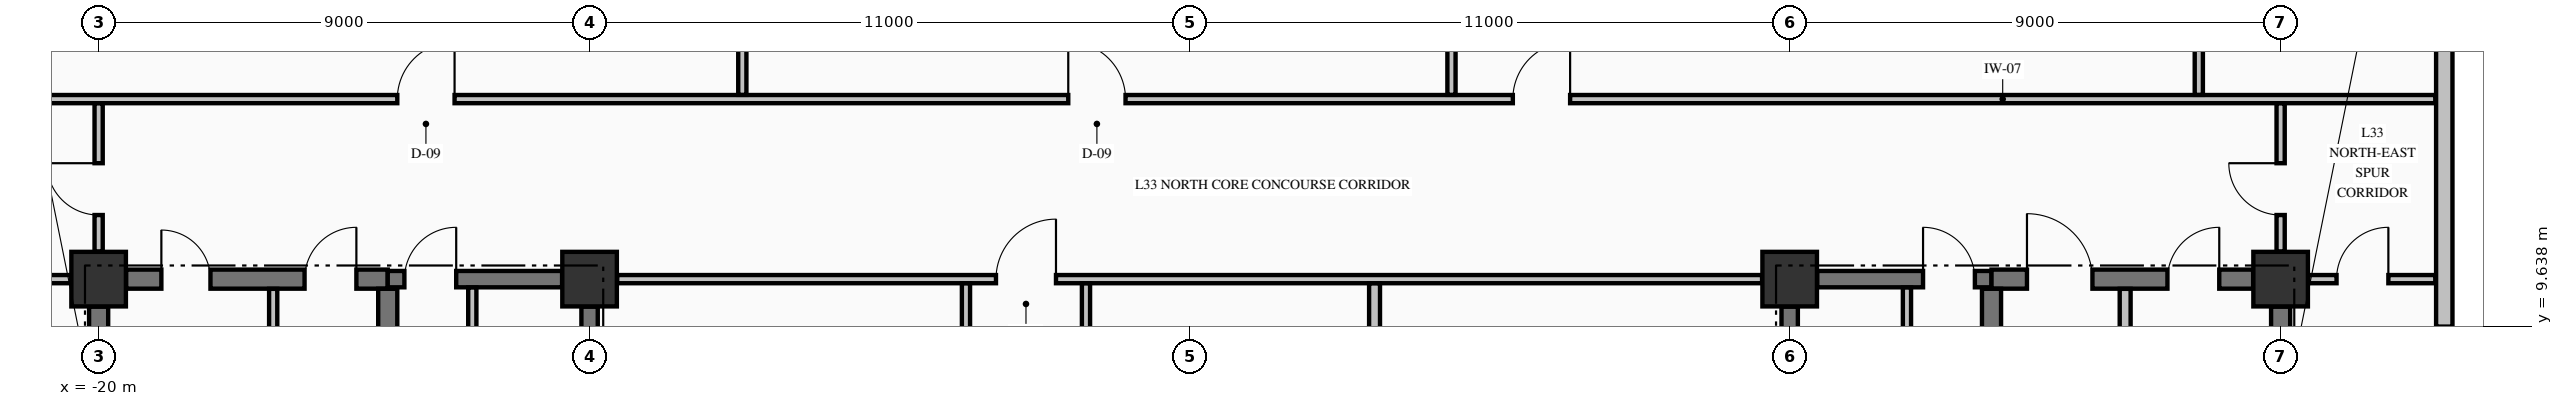
"""IFC4 building model, lengths in metres.
Left out: names, types, materials, properties, quantities, classifications, styles, units other than length and angle.
Written with IfcOpenShell. Run it as: python <this file> out.ifc"""

import sys

from ifc_helpers import new_model, si_unit, direction, frame, frame_2d, origin, origin_2d, place, context, subcontext, project, spatial, rectangle, extrude, element, fill, save


model = new_model("IFC4")
c1 = context("Model", 3, precision=1e-05, world=origin(), true_north=direction((0.0, 1.0)))
c2 = subcontext(c1, "Body", "Model", "MODEL_VIEW")
j1 = project(units=[si_unit("LENGTHUNIT", "METRE"), si_unit("PLANEANGLEUNIT", "RADIAN")], contexts=[c1])
p1 = place(None, origin())
s1 = spatial("IfcSite", under=j1, at=p1, CompositionType="ELEMENT")
p2 = place(p1, origin())
s2 = spatial("IfcBuilding", under=s1, at=p2, CompositionType="ELEMENT")
p3 = place(p2, frame((0.0, 0.0, 132.06)))
s3 = spatial("IfcBuildingStorey", under=s2, at=p3, CompositionType="ELEMENT", Elevation=132.06)
for number, where, z_axis, x_axis in (
    (1, (-20.0, 10.5, -0.25), (0.0, 0.0, 1.0), (1.0, 0.0, 0.0)),
    (2, (-11.0, 10.5, -0.25), (0.0, 0.0, 1.0), (1.0, 0.0, 0.0)),
    (3, (11.0, 10.5, -0.25), (0.0, 0.0, 1.0), (1.0, 0.0, 0.0)),
    (4, (20.0, 10.5, -0.25), (0.0, 0.0, 1.0), (1.0, 0.0, 0.0)),
):
    element("IfcColumn", number, at=place(p3, frame(where, z_axis=z_axis, x_axis=x_axis)), inside=s3, PredefinedType="COLUMN", context=c2, shape_type="SweptSolid", body=[
        extrude(rectangle(XDim=1.0, YDim=1.0, at=origin_2d()), origin(), (0.0, 0.0, 1.0), 3.57),
    ])
p4 = place(p3, frame((23.0, 9.63, 0.0), z_axis=(0.0, 0.0, 1.0), x_axis=(0.0, 1.0, 0.0)))
e5 = element("IfcWall", 5, at=p4, inside=s3, PredefinedType="STANDARD", context=c2, shape_type="SweptSolid", body=[
    extrude(rectangle(XDim=10.74, YDim=0.3, at=frame_2d((5.37, 0.0))), origin(), (0.0, 0.0, 1.0), 2.712),
])
p5 = place(p3, frame((-19.496, 10.5, 0.0), z_axis=(0.0, 0.0, 1.0), x_axis=(1.0, 0.0, 0.0)))
e6 = element("IfcWall", 6, at=p5, inside=s3, PredefinedType="SHEAR", context=c2, shape_type="SweptSolid", body=[
    extrude(rectangle(XDim=4.796, YDim=0.35, at=frame_2d((2.398, 0.0))), origin(), (0.0, 0.0, 1.0), 3.32),
])
p6 = place(p5, frame((0.646, 0.0, 0.0)))
e7 = element("IfcOpeningElement", 7, at=p6, cuts=e6, PredefinedType="OPENING", context=c2, shape_type="SweptSolid", body=[
    extrude(rectangle(XDim=0.9, YDim=2.15, at=frame_2d((0.45, 1.075))), frame((0.0, 0.185, 0.0), z_axis=(0.0, -1.0, 0.0), x_axis=(1.0, 0.0, 0.0)), (0.0, 0.0, 1.0), 0.37),
])
p7 = place(p5, frame((3.271, 0.0, 0.0)))
e8 = element("IfcOpeningElement", 8, at=p7, cuts=e6, PredefinedType="OPENING", context=c2, shape_type="SweptSolid", body=[
    extrude(rectangle(XDim=0.95, YDim=2.15, at=frame_2d((0.475, 1.075))), frame((0.0, 0.185, 0.0), z_axis=(0.0, -1.0, 0.0), x_axis=(1.0, 0.0, 0.0)), (0.0, 0.0, 1.0), 0.37),
])
p8 = place(p3, frame((-14.7, 10.5, 0.0), z_axis=(0.0, 0.0, 1.0), x_axis=(1.0, 0.0, 0.0)))
e9 = element("IfcWall", 9, at=p8, inside=s3, PredefinedType="SHEAR", context=c2, shape_type="SweptSolid", body=[
    extrude(rectangle(XDim=3.196, YDim=0.3, at=frame_2d((1.598, 0.0))), origin(), (0.0, 0.0, 1.0), 3.32),
])
p9 = place(p8, frame((0.305, 0.0, 0.0)))
e10 = element("IfcOpeningElement", 10, at=p9, cuts=e9, PredefinedType="OPENING", context=c2, shape_type="SweptSolid", body=[
    extrude(rectangle(XDim=0.95, YDim=2.15, at=frame_2d((0.475, 1.075))), frame((0.0, 0.16, 0.0), z_axis=(0.0, -1.0, 0.0), x_axis=(1.0, 0.0, 0.0)), (0.0, 0.0, 1.0), 0.32),
])
p10 = place(p3, frame((11.504, 10.5, 0.0), z_axis=(0.0, 0.0, 1.0), x_axis=(1.0, 0.0, 0.0)))
e11 = element("IfcWall", 11, at=p10, inside=s3, PredefinedType="SHEAR", context=c2, shape_type="SweptSolid", body=[
    extrude(rectangle(XDim=3.196, YDim=0.3, at=frame_2d((1.598, 0.0))), origin(), (0.0, 0.0, 1.0), 3.32),
])
p11 = place(p10, frame((1.941, 0.0, 0.0)))
e12 = element("IfcOpeningElement", 12, at=p11, cuts=e11, PredefinedType="OPENING", context=c2, shape_type="SweptSolid", body=[
    extrude(rectangle(XDim=0.95, YDim=2.15, at=frame_2d((0.475, 1.075))), frame((0.0, 0.16, 0.0), z_axis=(0.0, -1.0, 0.0), x_axis=(1.0, 0.0, 0.0)), (0.0, 0.0, 1.0), 0.32),
])
p12 = place(p3, frame((14.7, 10.5, 0.0), z_axis=(0.0, 0.0, 1.0), x_axis=(1.0, 0.0, 0.0)))
e13 = element("IfcWall", 13, at=p12, inside=s3, PredefinedType="SHEAR", context=c2, shape_type="SweptSolid", body=[
    extrude(rectangle(XDim=4.796, YDim=0.35, at=frame_2d((2.398, 0.0))), origin(), (0.0, 0.0, 1.0), 3.32),
])
p13 = place(p12, frame((0.65, 0.0, 0.0)))
e14 = element("IfcOpeningElement", 14, at=p13, cuts=e13, PredefinedType="OPENING", context=c2, shape_type="SweptSolid", body=[
    extrude(rectangle(XDim=1.2, YDim=2.15, at=frame_2d((0.6, 1.075))), frame((0.0, 0.185, 0.0), z_axis=(0.0, -1.0, 0.0), x_axis=(1.0, 0.0, 0.0)), (0.0, 0.0, 1.0), 0.37),
])
p14 = place(p12, frame((3.225, 0.0, 0.0)))
e15 = element("IfcOpeningElement", 15, at=p14, cuts=e13, PredefinedType="OPENING", context=c2, shape_type="SweptSolid", body=[
    extrude(rectangle(XDim=0.95, YDim=2.15, at=frame_2d((0.475, 1.075))), frame((0.0, 0.185, 0.0), z_axis=(0.0, -1.0, 0.0), x_axis=(1.0, 0.0, 0.0)), (0.0, 0.0, 1.0), 0.37),
])
p15 = place(p3, frame((-27.835, 10.5, 0.0), z_axis=(0.0, 0.0, 1.0), x_axis=(1.0, 0.0, 0.0)))
e16 = element("IfcWall", 16, at=p15, inside=s3, PredefinedType="PARTITIONING", context=c2, shape_type="SweptSolid", body=[
    extrude(rectangle(XDim=7.329, YDim=0.15, at=frame_2d((3.665, 0.0))), origin(), (0.0, 0.0, 1.0), 3.32),
])
p16 = place(p15, frame((3.335, 0.0, 0.0)))
e17 = element("IfcOpeningElement", 17, at=p16, cuts=e16, PredefinedType="OPENING", context=c2, shape_type="SweptSolid", body=[
    extrude(rectangle(XDim=1.0, YDim=2.15, at=frame_2d((0.5, 1.075))), frame((0.0, 0.085, 0.0), z_axis=(0.0, -1.0, 0.0), x_axis=(1.0, 0.0, 0.0)), (0.0, 0.0, 1.0), 0.17),
])
p17 = place(p3, frame((-10.494, 10.5, 0.0), z_axis=(0.0, 0.0, 1.0), x_axis=(1.0, 0.0, 0.0)))
e18 = element("IfcWall", 18, at=p17, inside=s3, PredefinedType="PARTITIONING", context=c2, shape_type="SweptSolid", body=[
    extrude(rectangle(XDim=20.988, YDim=0.15, at=frame_2d((10.494, 0.0))), origin(), (0.0, 0.0, 1.0), 3.32),
])
p18 = place(p17, frame((6.944, 0.0, 0.0)))
e19 = element("IfcOpeningElement", 19, at=p18, cuts=e18, PredefinedType="OPENING", context=c2, shape_type="SweptSolid", body=[
    extrude(rectangle(XDim=1.1, YDim=2.15, at=frame_2d((0.55, 1.075))), frame((0.0, 0.085, 0.0), z_axis=(0.0, -1.0, 0.0), x_axis=(1.0, 0.0, 0.0)), (0.0, 0.0, 1.0), 0.17),
])
p19 = place(p3, frame((20.506, 10.5, 0.0), z_axis=(0.0, 0.0, 1.0), x_axis=(1.0, 0.0, 0.0)))
e20 = element("IfcWall", 20, at=p19, inside=s3, PredefinedType="PARTITIONING", context=c2, shape_type="SweptSolid", body=[
    extrude(rectangle(XDim=2.329, YDim=0.15, at=frame_2d((1.165, 0.0))), origin(), (0.0, 0.0, 1.0), 3.32),
])
p20 = place(p19, frame((0.519, 0.0, 0.0)))
e21 = element("IfcOpeningElement", 21, at=p20, cuts=e20, PredefinedType="OPENING", context=c2, shape_type="SweptSolid", body=[
    extrude(rectangle(XDim=0.95, YDim=2.15, at=frame_2d((0.475, 1.075))), frame((0.0, 0.085, 0.0), z_axis=(0.0, -1.0, 0.0), x_axis=(1.0, 0.0, 0.0)), (0.0, 0.0, 1.0), 0.17),
])
p21 = place(p3, frame((-27.835, 13.8, 0.0), z_axis=(0.0, 0.0, 1.0), x_axis=(1.0, 0.0, 0.0)))
e22 = element("IfcWall", 22, at=p21, inside=s3, PredefinedType="PARTITIONING", context=c2, shape_type="SweptSolid", body=[
    extrude(rectangle(XDim=50.67, YDim=0.15, at=frame_2d((25.335, 0.0))), origin(), (0.0, 0.0, 1.0), 3.32),
])
p22 = place(p21, frame((13.31, 0.0, 0.0)))
e23 = element("IfcOpeningElement", 23, at=p22, cuts=e22, PredefinedType="OPENING", context=c2, shape_type="SweptSolid", body=[
    extrude(rectangle(XDim=1.05, YDim=2.15, at=frame_2d((0.525, 1.075))), frame((0.0, 0.085, 0.0), z_axis=(0.0, -1.0, 0.0), x_axis=(1.0, 0.0, 0.0)), (0.0, 0.0, 1.0), 0.17),
])
p23 = place(p21, frame((25.61, 0.0, 0.0)))
e24 = element("IfcOpeningElement", 24, at=p23, cuts=e22, PredefinedType="OPENING", context=c2, shape_type="SweptSolid", body=[
    extrude(rectangle(XDim=1.05, YDim=2.15, at=frame_2d((0.525, 1.075))), frame((0.0, 0.085, 0.0), z_axis=(0.0, -1.0, 0.0), x_axis=(1.0, 0.0, 0.0)), (0.0, 0.0, 1.0), 0.17),
])
p24 = place(p21, frame((33.76, 0.0, 0.0)))
e25 = element("IfcOpeningElement", 25, at=p24, cuts=e22, PredefinedType="OPENING", context=c2, shape_type="SweptSolid", body=[
    extrude(rectangle(XDim=1.05, YDim=2.15, at=frame_2d((0.525, 1.075))), frame((0.0, 0.085, 0.0), z_axis=(0.0, -1.0, 0.0), x_axis=(1.0, 0.0, 0.0)), (0.0, 0.0, 1.0), 0.17),
])
p25 = place(p3, frame((-20.0, 0.504, 0.0), z_axis=(0.0, 0.0, 1.0), x_axis=(0.0, 1.0, 0.0)))
e26 = element("IfcWall", 26, at=p25, inside=s3, PredefinedType="SHEAR", context=c2, shape_type="SweptSolid", body=[
    extrude(rectangle(XDim=9.492, YDim=0.35, at=frame_2d((4.746, 0.0))), origin(), (0.0, 0.0, 1.0), 3.32),
])
p26 = place(p3, frame((-14.7, 5.852, 0.0), z_axis=(0.0, 0.0, 1.0), x_axis=(0.0, 1.0, 0.0)))
e27 = element("IfcWall", 27, at=p26, inside=s3, PredefinedType="SHEAR", context=c2, shape_type="SweptSolid", body=[
    extrude(rectangle(XDim=4.471, YDim=0.35, at=frame_2d((2.235, 0.0))), origin(), (0.0, 0.0, 1.0), 3.32),
])
for number, where, z_axis, x_axis in (
    (28, (-11.0, 5.852, 0.0), (0.0, 0.0, 1.0), (0.0, 1.0, 0.0)),
    (29, (11.0, 5.852, 0.0), (0.0, 0.0, 1.0), (0.0, 1.0, 0.0)),
):
    element("IfcWall", number, at=place(p3, frame(where, z_axis=z_axis, x_axis=x_axis)), inside=s3, PredefinedType="SHEAR", context=c2, shape_type="SweptSolid", body=[
        extrude(rectangle(XDim=4.144, YDim=0.3, at=frame_2d((2.072, 0.0))), origin(), (0.0, 0.0, 1.0), 3.32),
    ])
p27 = place(p3, frame((14.7, 5.852, 0.0), z_axis=(0.0, 0.0, 1.0), x_axis=(0.0, 1.0, 0.0)))
e30 = element("IfcWall", 30, at=p27, inside=s3, PredefinedType="SHEAR", context=c2, shape_type="SweptSolid", body=[
    extrude(rectangle(XDim=4.471, YDim=0.35, at=frame_2d((2.235, 0.0))), origin(), (0.0, 0.0, 1.0), 3.32),
])
p28 = place(p3, frame((20.0, 5.377, 0.0), z_axis=(0.0, 0.0, 1.0), x_axis=(0.0, 1.0, 0.0)))
e31 = element("IfcWall", 31, at=p28, inside=s3, PredefinedType="SHEAR", context=c2, shape_type="SweptSolid", body=[
    extrude(rectangle(XDim=4.619, YDim=0.35, at=frame_2d((2.31, 0.0))), origin(), (0.0, 0.0, 1.0), 3.32),
])
p29 = place(p3, frame((-20.0, 11.006, 0.0), z_axis=(0.0, 0.0, 1.0), x_axis=(0.0, 1.0, 0.0)))
e32 = element("IfcWall", 32, at=p29, inside=s3, PredefinedType="PARTITIONING", context=c2, shape_type="SweptSolid", body=[
    extrude(rectangle(XDim=2.716, YDim=0.15, at=frame_2d((1.358, 0.0))), origin(), (0.0, 0.0, 1.0), 2.81),
])
p30 = place(p29, frame((0.669, 0.0, 0.0)))
e33 = element("IfcOpeningElement", 33, at=p30, cuts=e32, PredefinedType="OPENING", context=c2, shape_type="SweptSolid", body=[
    extrude(rectangle(XDim=0.95, YDim=2.15, at=frame_2d((0.475, 1.075))), frame((0.0, 0.085, 0.0), z_axis=(0.0, -1.0, 0.0), x_axis=(1.0, 0.0, 0.0)), (0.0, 0.0, 1.0), 0.17),
])
p31 = place(p3, frame((-16.8, 4.878, 0.0), z_axis=(0.0, 0.0, 1.0), x_axis=(0.0, 1.0, 0.0)))
e34 = element("IfcWall", 34, at=p31, inside=s3, PredefinedType="PARTITIONING", context=c2, shape_type="SweptSolid", body=[
    extrude(rectangle(XDim=5.444, YDim=0.15, at=frame_2d((2.722, 0.0))), origin(), (0.0, 0.0, 1.0), 3.32),
])
p32 = place(p3, frame((-13.15, 7.228, 0.0), z_axis=(0.0, 0.0, 1.0), x_axis=(0.0, 1.0, 0.0)))
e35 = element("IfcWall", 35, at=p32, inside=s3, PredefinedType="PARTITIONING", context=c2, shape_type="SweptSolid", body=[
    extrude(rectangle(XDim=3.119, YDim=0.15, at=frame_2d((1.56, 0.0))), origin(), (0.0, 0.0, 1.0), 3.32),
])
p33 = place(p32, frame((1.097, 0.0, 0.0)))
e36 = element("IfcOpeningElement", 36, at=p33, cuts=e35, PredefinedType="OPENING", context=c2, shape_type="SweptSolid", body=[
    extrude(rectangle(XDim=0.95, YDim=2.15, at=frame_2d((0.475, 1.075))), frame((0.0, 0.085, 0.0), z_axis=(0.0, -1.0, 0.0), x_axis=(1.0, 0.0, 0.0)), (0.0, 0.0, 1.0), 0.17),
])
p34 = place(p3, frame((-8.2, 13.878, 0.0), z_axis=(0.0, 0.0, 1.0), x_axis=(0.0, 1.0, 0.0)))
e37 = element("IfcWall", 37, at=p34, inside=s3, PredefinedType="PARTITIONING", context=c2, shape_type="SweptSolid", body=[
    extrude(rectangle(XDim=11.457, YDim=0.15, at=frame_2d((5.729, 0.0))), origin(), (0.0, 0.0, 1.0), 3.32),
])
for number, where, z_axis, x_axis in (
    (38, (-4.1, 2.978, 0.0), (0.0, 0.0, 1.0), (0.0, 1.0, 0.0)),
    (39, (-1.9, 2.978, 0.0), (0.0, 0.0, 1.0), (0.0, 1.0, 0.0)),
):
    element("IfcWall", number, at=place(p3, frame(where, z_axis=z_axis, x_axis=x_axis)), inside=s3, PredefinedType="PARTITIONING", context=c2, shape_type="SweptSolid", body=[
        extrude(rectangle(XDim=7.444, YDim=0.15, at=frame_2d((3.722, 0.0))), origin(), (0.0, 0.0, 1.0), 3.32),
    ])
p35 = place(p3, frame((3.39, 2.978, 0.0), z_axis=(0.0, 0.0, 1.0), x_axis=(0.0, 1.0, 0.0)))
e40 = element("IfcWall", 40, at=p35, inside=s3, PredefinedType="PARTITIONING", context=c2, shape_type="SweptSolid", body=[
    extrude(rectangle(XDim=7.444, YDim=0.2, at=frame_2d((3.722, 0.0))), origin(), (0.0, 0.0, 1.0), 3.32),
])
p36 = place(p3, frame((4.8, 13.878, 0.0), z_axis=(0.0, 0.0, 1.0), x_axis=(0.0, 1.0, 0.0)))
e41 = element("IfcWall", 41, at=p36, inside=s3, PredefinedType="PARTITIONING", context=c2, shape_type="SweptSolid", body=[
    extrude(rectangle(XDim=11.457, YDim=0.15, at=frame_2d((5.729, 0.0))), origin(), (0.0, 0.0, 1.0), 3.32),
])
p37 = place(p3, frame((13.15, 7.228, 0.0), z_axis=(0.0, 0.0, 1.0), x_axis=(0.0, 1.0, 0.0)))
e42 = element("IfcWall", 42, at=p37, inside=s3, PredefinedType="PARTITIONING", context=c2, shape_type="SweptSolid", body=[
    extrude(rectangle(XDim=3.119, YDim=0.15, at=frame_2d((1.56, 0.0))), origin(), (0.0, 0.0, 1.0), 3.32),
])
p38 = place(p37, frame((1.097, 0.0, 0.0)))
e43 = element("IfcOpeningElement", 43, at=p38, cuts=e42, PredefinedType="OPENING", context=c2, shape_type="SweptSolid", body=[
    extrude(rectangle(XDim=0.95, YDim=2.15, at=frame_2d((0.475, 1.075))), frame((0.0, 0.085, 0.0), z_axis=(0.0, -1.0, 0.0), x_axis=(1.0, 0.0, 0.0)), (0.0, 0.0, 1.0), 0.17),
])
p39 = place(p3, frame((17.15, 7.928, 0.0), z_axis=(0.0, 0.0, 1.0), x_axis=(0.0, 1.0, 0.0)))
e44 = element("IfcWall", 44, at=p39, inside=s3, PredefinedType="PARTITIONING", context=c2, shape_type="SweptSolid", body=[
    extrude(rectangle(XDim=2.394, YDim=0.2, at=frame_2d((1.197, 0.0))), origin(), (0.0, 0.0, 1.0), 3.32),
])
p40 = place(p3, frame((18.5, 13.878, 0.0), z_axis=(0.0, 0.0, 1.0), x_axis=(0.0, 1.0, 0.0)))
e45 = element("IfcWall", 45, at=p40, inside=s3, PredefinedType="PARTITIONING", context=c2, shape_type="SweptSolid", body=[
    extrude(rectangle(XDim=6.516, YDim=0.15, at=frame_2d((3.258, 0.0))), origin(), (0.0, 0.0, 1.0), 3.32),
])
p41 = place(p3, frame((20.0, 11.006, 0.0), z_axis=(0.0, 0.0, 1.0), x_axis=(0.0, 1.0, 0.0)))
e46 = element("IfcWall", 46, at=p41, inside=s3, PredefinedType="PARTITIONING", context=c2, shape_type="SweptSolid", body=[
    extrude(rectangle(XDim=2.716, YDim=0.15, at=frame_2d((1.358, 0.0))), origin(), (0.0, 0.0, 1.0), 2.81),
])
p42 = place(p41, frame((0.669, 0.0, 0.0)))
e47 = element("IfcOpeningElement", 47, at=p42, cuts=e46, PredefinedType="OPENING", context=c2, shape_type="SweptSolid", body=[
    extrude(rectangle(XDim=0.95, YDim=2.15, at=frame_2d((0.475, 1.075))), frame((0.0, 0.085, 0.0), z_axis=(0.0, -1.0, 0.0), x_axis=(1.0, 0.0, 0.0)), (0.0, 0.0, 1.0), 0.17),
])
p43 = place(p9, origin())
e48 = element("IfcDoor", 48, at=p43, inside=s3, OperationType="SINGLE_SWING_RIGHT", PredefinedType="DOOR", context=c2, shape_type="SweptSolid", body=[
    extrude(rectangle(XDim=0.95, YDim=2.15, at=frame_2d((0.475, 1.075))), frame((0.0, 0.025, 0.0), z_axis=(0.0, -1.0, 0.0), x_axis=(1.0, 0.0, 0.0)), (0.0, 0.0, 1.0), 0.05),
])
fill(e10, e48)
p44 = place(p11, origin())
e49 = element("IfcDoor", 49, at=p44, inside=s3, OperationType="SINGLE_SWING_LEFT", PredefinedType="DOOR", context=c2, shape_type="SweptSolid", body=[
    extrude(rectangle(XDim=0.95, YDim=2.15, at=frame_2d((0.475, 1.075))), frame((0.0, 0.025, 0.0), z_axis=(0.0, -1.0, 0.0), x_axis=(1.0, 0.0, 0.0)), (0.0, 0.0, 1.0), 0.05),
])
fill(e12, e49)
p45 = place(p6, origin())
e50 = element("IfcDoor", 50, at=p45, inside=s3, OperationType="SINGLE_SWING_LEFT", PredefinedType="DOOR", context=c2, shape_type="SweptSolid", body=[
    extrude(rectangle(XDim=0.9, YDim=2.15, at=frame_2d((0.45, 1.075))), frame((0.0, 0.025, 0.0), z_axis=(0.0, -1.0, 0.0), x_axis=(1.0, 0.0, 0.0)), (0.0, 0.0, 1.0), 0.05),
])
fill(e7, e50)
p46 = place(p7, origin())
e51 = element("IfcDoor", 51, at=p46, inside=s3, OperationType="SINGLE_SWING_RIGHT", PredefinedType="DOOR", context=c2, shape_type="SweptSolid", body=[
    extrude(rectangle(XDim=0.95, YDim=2.15, at=frame_2d((0.475, 1.075))), frame((0.0, 0.025, 0.0), z_axis=(0.0, -1.0, 0.0), x_axis=(1.0, 0.0, 0.0)), (0.0, 0.0, 1.0), 0.05),
])
fill(e8, e51)
p47 = place(p13, origin())
e52 = element("IfcDoor", 52, at=p47, inside=s3, OperationType="SINGLE_SWING_LEFT", PredefinedType="DOOR", context=c2, shape_type="SweptSolid", body=[
    extrude(rectangle(XDim=1.2, YDim=2.15, at=frame_2d((0.6, 1.075))), frame((0.0, 0.025, 0.0), z_axis=(0.0, -1.0, 0.0), x_axis=(1.0, 0.0, 0.0)), (0.0, 0.0, 1.0), 0.05),
])
fill(e14, e52)
p48 = place(p14, origin())
e53 = element("IfcDoor", 53, at=p48, inside=s3, OperationType="SINGLE_SWING_RIGHT", PredefinedType="DOOR", context=c2, shape_type="SweptSolid", body=[
    extrude(rectangle(XDim=0.95, YDim=2.15, at=frame_2d((0.475, 1.075))), frame((0.0, 0.025, 0.0), z_axis=(0.0, -1.0, 0.0), x_axis=(1.0, 0.0, 0.0)), (0.0, 0.0, 1.0), 0.05),
])
fill(e15, e53)
p49 = place(p18, origin())
e54 = element("IfcDoor", 54, at=p49, inside=s3, OperationType="SINGLE_SWING_RIGHT", PredefinedType="DOOR", context=c2, shape_type="SweptSolid", body=[
    extrude(rectangle(XDim=1.1, YDim=2.15, at=frame_2d((0.55, 1.075))), frame((0.0, 0.025, 0.0), z_axis=(0.0, -1.0, 0.0), x_axis=(1.0, 0.0, 0.0)), (0.0, 0.0, 1.0), 0.05),
])
fill(e19, e54)
p50 = place(p22, origin())
e55 = element("IfcDoor", 55, at=p50, inside=s3, OperationType="SINGLE_SWING_RIGHT", PredefinedType="DOOR", context=c2, shape_type="SweptSolid", body=[
    extrude(rectangle(XDim=1.05, YDim=2.15, at=frame_2d((0.525, 1.075))), frame((0.0, 0.025, 0.0), z_axis=(0.0, -1.0, 0.0), x_axis=(1.0, 0.0, 0.0)), (0.0, 0.0, 1.0), 0.05),
])
fill(e23, e55)
p51 = place(p23, origin())
e56 = element("IfcDoor", 56, at=p51, inside=s3, OperationType="SINGLE_SWING_LEFT", PredefinedType="DOOR", context=c2, shape_type="SweptSolid", body=[
    extrude(rectangle(XDim=1.05, YDim=2.15, at=frame_2d((0.525, 1.075))), frame((0.0, 0.025, 0.0), z_axis=(0.0, -1.0, 0.0), x_axis=(1.0, 0.0, 0.0)), (0.0, 0.0, 1.0), 0.05),
])
fill(e24, e56)
p52 = place(p24, origin())
e57 = element("IfcDoor", 57, at=p52, inside=s3, OperationType="SINGLE_SWING_RIGHT", PredefinedType="DOOR", context=c2, shape_type="SweptSolid", body=[
    extrude(rectangle(XDim=1.05, YDim=2.15, at=frame_2d((0.525, 1.075))), frame((0.0, 0.025, 0.0), z_axis=(0.0, -1.0, 0.0), x_axis=(1.0, 0.0, 0.0)), (0.0, 0.0, 1.0), 0.05),
])
fill(e25, e57)
p53 = place(p30, origin())
e58 = element("IfcDoor", 58, at=p53, inside=s3, OperationType="SINGLE_SWING_RIGHT", PredefinedType="DOOR", context=c2, shape_type="SweptSolid", body=[
    extrude(rectangle(XDim=0.95, YDim=2.15, at=frame_2d((0.475, 1.075))), frame((0.0, 0.025, 0.0), z_axis=(0.0, -1.0, 0.0), x_axis=(1.0, 0.0, 0.0)), (0.0, 0.0, 1.0), 0.05),
])
fill(e33, e58)
p54 = place(p42, origin())
e59 = element("IfcDoor", 59, at=p54, inside=s3, OperationType="SINGLE_SWING_RIGHT", PredefinedType="DOOR", context=c2, shape_type="SweptSolid", body=[
    extrude(rectangle(XDim=0.95, YDim=2.15, at=frame_2d((0.475, 1.075))), frame((0.0, 0.025, 0.0), z_axis=(0.0, -1.0, 0.0), x_axis=(1.0, 0.0, 0.0)), (0.0, 0.0, 1.0), 0.05),
])
fill(e47, e59)
p55 = place(p20, origin())
e60 = element("IfcDoor", 60, at=p55, inside=s3, OperationType="SINGLE_SWING_RIGHT", PredefinedType="DOOR", context=c2, shape_type="SweptSolid", body=[
    extrude(rectangle(XDim=0.95, YDim=2.15, at=frame_2d((0.475, 1.075))), frame((0.0, 0.025, 0.0), z_axis=(0.0, -1.0, 0.0), x_axis=(1.0, 0.0, 0.0)), (0.0, 0.0, 1.0), 0.05),
])
fill(e21, e60)
save(model, sys.argv[1])
